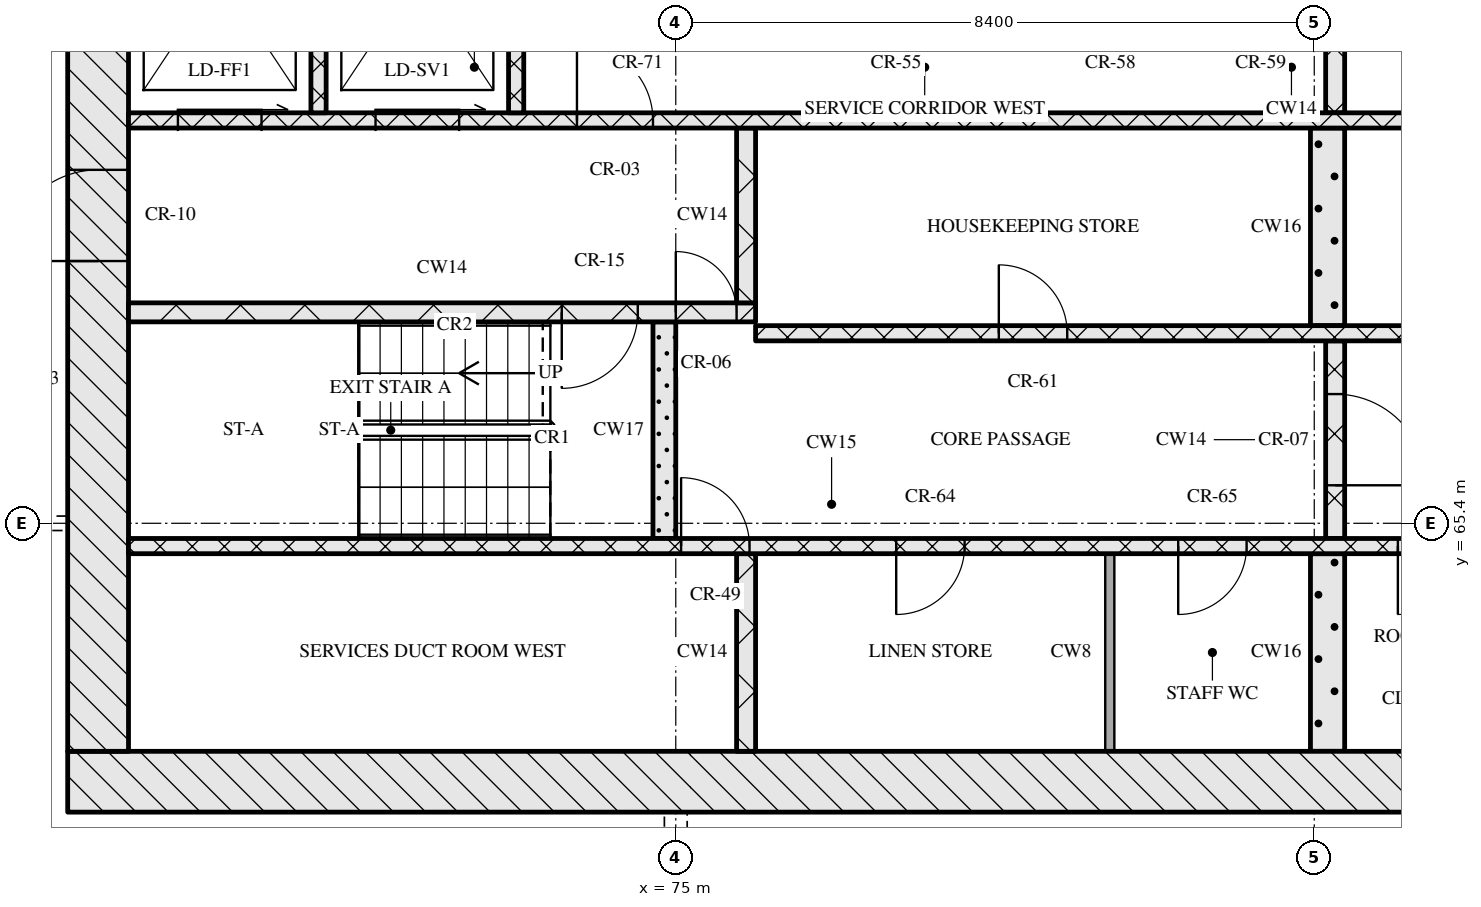
"""IFC4 building model, lengths in metres.
Left out: names, types, materials, properties, quantities, classifications, styles, units other than length and angle.
Written with IfcOpenShell. Run it as: python <this file> out.ifc"""

import sys

from ifc_helpers import new_model, si_unit, direction, frame, frame_2d, origin, place, context, subcontext, project, spatial, rectangle, extrude, element, fill, save


model = new_model("IFC4")
c1 = context("Model", 3, precision=1e-05, world=origin(), true_north=direction((0.0, 1.0)))
c2 = subcontext(c1, "Body", "Model", "MODEL_VIEW")
j1 = project(units=[si_unit("LENGTHUNIT", "METRE"), si_unit("PLANEANGLEUNIT", "RADIAN")], contexts=[c1])
p1 = place(None, origin())
s1 = spatial("IfcSite", under=j1, at=p1, CompositionType="ELEMENT")
p2 = place(p1, origin())
s2 = spatial("IfcBuilding", under=s1, at=p2, CompositionType="ELEMENT")
p3 = place(p2, frame((0.0, 0.0, 165.45)))
s3 = spatial("IfcBuildingStorey", under=s2, at=p3, CompositionType="ELEMENT", Elevation=165.45)
p4 = place(p3, frame((67.0, 62.0, 0.0), z_axis=(0.0, 0.0, 1.0), x_axis=(1.0, 0.0, 0.0)))
e1 = element("IfcWall", 1, at=p4, inside=s3, PredefinedType="SOLIDWALL", context=c2, shape_type="SweptSolid", body=[
    extrude(rectangle(XDim=41.2, YDim=0.8, at=frame_2d((20.6, 0.0))), origin(), (0.0, 0.0, 1.0), 3.32),
])
p5 = place(p4, frame((20.95, 0.0, 0.0)))
e2 = element("IfcOpeningElement", 2, at=p5, cuts=e1, PredefinedType="OPENING", context=c2, shape_type="SweptSolid", body=[
    extrude(rectangle(XDim=1.8, YDim=2.1, at=frame_2d((0.9, 1.05))), frame((0.0, 0.41, 0.0), z_axis=(0.0, -1.0, 0.0), x_axis=(1.0, 0.0, 0.0)), (0.0, 0.0, 1.0), 0.82),
])
p6 = place(p3, frame((67.4, 62.4, 0.0), z_axis=(0.0, 0.0, 1.0), x_axis=(0.0, 1.0, 0.0)))
e3 = element("IfcWall", 3, at=p6, inside=s3, PredefinedType="SOLIDWALL", context=c2, shape_type="SweptSolid", body=[
    extrude(rectangle(XDim=12.0, YDim=0.8, at=frame_2d((6.0, 0.0))), origin(), (0.0, 0.0, 1.0), 3.32),
])
p7 = place(p6, frame((6.45, 0.0, 0.0)))
e4 = element("IfcOpeningElement", 4, at=p7, cuts=e3, PredefinedType="OPENING", context=c2, shape_type="SweptSolid", body=[
    extrude(rectangle(XDim=1.2, YDim=2.1, at=frame_2d((0.6, 1.05))), frame((0.0, 0.41, 0.0), z_axis=(0.0, -1.0, 0.0), x_axis=(1.0, 0.0, 0.0)), (0.0, 0.0, 1.0), 0.82),
])
p8 = place(p3, frame((75.925, 62.4, 0.0), z_axis=(0.0, 0.0, 1.0), x_axis=(0.0, 1.0, 0.0)))
e5 = element("IfcWall", 5, at=p8, inside=s3, PredefinedType="SOLIDWALL", context=c2, shape_type="SweptSolid", body=[
    extrude(rectangle(XDim=2.6, YDim=0.25, at=frame_2d((1.3, 0.0))), origin(), (0.0, 0.0, 1.0), 3.32),
])
p9 = place(p3, frame((80.71, 62.4, 0.0), z_axis=(0.0, 0.0, 1.0), x_axis=(0.0, 1.0, 0.0)))
e6 = element("IfcWall", 6, at=p9, inside=s3, PredefinedType="PARTITIONING", context=c2, shape_type="SweptSolid", body=[
    extrude(rectangle(XDim=2.6, YDim=0.12, at=frame_2d((1.3, 0.0))), origin(), (0.0, 0.0, 1.0), 3.32),
])
p10 = place(p3, frame((83.575, 62.4, 0.0), z_axis=(0.0, 0.0, 1.0), x_axis=(0.0, 1.0, 0.0)))
e7 = element("IfcWall", 7, at=p10, inside=s3, PredefinedType="SOLIDWALL", context=c2, shape_type="SweptSolid", body=[
    extrude(rectangle(XDim=2.6, YDim=0.45, at=frame_2d((1.3, 0.0))), origin(), (0.0, 0.0, 1.0), 3.32),
])
p11 = place(p3, frame((67.8, 65.1, 0.0), z_axis=(0.0, 0.0, 1.0), x_axis=(1.0, 0.0, 0.0)))
e8 = element("IfcWall", 8, at=p11, inside=s3, PredefinedType="SOLIDWALL", context=c2, shape_type="SweptSolid", body=[
    extrude(rectangle(XDim=18.5, YDim=0.2, at=frame_2d((9.25, 0.0))), origin(), (0.0, 0.0, 1.0), 3.32),
])
p12 = place(p11, frame((7.27, 0.0, 0.0)))
e9 = element("IfcOpeningElement", 9, at=p12, cuts=e8, PredefinedType="OPENING", context=c2, shape_type="SweptSolid", body=[
    extrude(rectangle(XDim=0.9, YDim=2.1, at=frame_2d((0.45, 1.05))), frame((0.0, 0.11, 0.0), z_axis=(0.0, -1.0, 0.0), x_axis=(1.0, 0.0, 0.0)), (0.0, 0.0, 1.0), 0.22),
])
p13 = place(p11, frame((10.1, 0.0, 0.0)))
e10 = element("IfcOpeningElement", 10, at=p13, cuts=e8, PredefinedType="OPENING", context=c2, shape_type="SweptSolid", body=[
    extrude(rectangle(XDim=0.9, YDim=2.1, at=frame_2d((0.45, 1.05))), frame((0.0, 0.11, 0.0), z_axis=(0.0, -1.0, 0.0), x_axis=(1.0, 0.0, 0.0)), (0.0, 0.0, 1.0), 0.22),
])
p14 = place(p11, frame((13.81, 0.0, 0.0)))
e11 = element("IfcOpeningElement", 11, at=p14, cuts=e8, PredefinedType="OPENING", context=c2, shape_type="SweptSolid", body=[
    extrude(rectangle(XDim=0.9, YDim=2.1, at=frame_2d((0.45, 1.05))), frame((0.0, 0.11, 0.0), z_axis=(0.0, -1.0, 0.0), x_axis=(1.0, 0.0, 0.0)), (0.0, 0.0, 1.0), 0.22),
])
p15 = place(p11, frame((16.7, 0.0, 0.0)))
e12 = element("IfcOpeningElement", 12, at=p15, cuts=e8, PredefinedType="OPENING", context=c2, shape_type="SweptSolid", body=[
    extrude(rectangle(XDim=0.9, YDim=2.1, at=frame_2d((0.45, 1.05))), frame((0.0, 0.11, 0.0), z_axis=(0.0, -1.0, 0.0), x_axis=(1.0, 0.0, 0.0)), (0.0, 0.0, 1.0), 0.22),
])
p16 = place(p3, frame((74.85, 65.2, 0.0), z_axis=(0.0, 0.0, 1.0), x_axis=(0.0, 1.0, 0.0)))
e13 = element("IfcWall", 13, at=p16, inside=s3, PredefinedType="SOLIDWALL", context=c2, shape_type="SweptSolid", body=[
    extrude(rectangle(XDim=2.85, YDim=0.3, at=frame_2d((1.425, 0.0))), origin(), (0.0, 0.0, 1.0), 3.32),
])
p17 = place(p3, frame((83.675, 65.2, 0.0), z_axis=(0.0, 0.0, 1.0), x_axis=(0.0, 1.0, 0.0)))
e14 = element("IfcWall", 14, at=p17, inside=s3, PredefinedType="SOLIDWALL", context=c2, shape_type="SweptSolid", body=[
    extrude(rectangle(XDim=2.6, YDim=0.25, at=frame_2d((1.3, 0.0))), origin(), (0.0, 0.0, 1.0), 3.32),
])
p18 = place(p17, frame((0.7, 0.0, 0.0)))
e15 = element("IfcOpeningElement", 15, at=p18, cuts=e14, PredefinedType="OPENING", context=c2, shape_type="SweptSolid", body=[
    extrude(rectangle(XDim=1.2, YDim=2.1, at=frame_2d((0.6, 1.05))), frame((0.0, 0.135, 0.0), z_axis=(0.0, -1.0, 0.0), x_axis=(1.0, 0.0, 0.0)), (0.0, 0.0, 1.0), 0.27),
])
p19 = place(p3, frame((76.05, 67.9, 0.0), z_axis=(0.0, 0.0, 1.0), x_axis=(1.0, 0.0, 0.0)))
e16 = element("IfcWall", 16, at=p19, inside=s3, PredefinedType="SOLIDWALL", context=c2, shape_type="SweptSolid", body=[
    extrude(rectangle(XDim=23.1, YDim=0.2, at=frame_2d((11.55, 0.0))), origin(), (0.0, 0.0, 1.0), 3.32),
])
p20 = place(p19, frame((3.2, 0.0, 0.0)))
e17 = element("IfcOpeningElement", 17, at=p20, cuts=e16, PredefinedType="OPENING", context=c2, shape_type="SweptSolid", body=[
    extrude(rectangle(XDim=0.9, YDim=2.1, at=frame_2d((0.45, 1.05))), frame((0.0, 0.11, 0.0), z_axis=(0.0, -1.0, 0.0), x_axis=(1.0, 0.0, 0.0)), (0.0, 0.0, 1.0), 0.22),
])
p21 = place(p19, frame((9.7, 0.0, 0.0)))
e18 = element("IfcOpeningElement", 18, at=p21, cuts=e16, PredefinedType="OPENING", context=c2, shape_type="SweptSolid", body=[
    extrude(rectangle(XDim=0.9, YDim=2.1, at=frame_2d((0.45, 1.05))), frame((0.0, 0.11, 0.0), z_axis=(0.0, -1.0, 0.0), x_axis=(1.0, 0.0, 0.0)), (0.0, 0.0, 1.0), 0.22),
])
p22 = place(p19, frame((13.55, 0.0, 0.0)))
e19 = element("IfcOpeningElement", 19, at=p22, cuts=e16, PredefinedType="OPENING", context=c2, shape_type="SweptSolid", body=[
    extrude(rectangle(XDim=1.0, YDim=2.1, at=frame_2d((0.5, 1.05))), frame((0.0, 0.11, 0.0), z_axis=(0.0, -1.0, 0.0), x_axis=(1.0, 0.0, 0.0)), (0.0, 0.0, 1.0), 0.22),
])
p23 = place(p19, frame((16.2, 0.0, 0.0)))
e20 = element("IfcOpeningElement", 20, at=p23, cuts=e16, PredefinedType="OPENING", context=c2, shape_type="SweptSolid", body=[
    extrude(rectangle(XDim=1.1, YDim=2.1, at=frame_2d((0.55, 1.05))), frame((0.0, 0.11, 0.0), z_axis=(0.0, -1.0, 0.0), x_axis=(1.0, 0.0, 0.0)), (0.0, 0.0, 1.0), 0.22),
])
p24 = place(p19, frame((18.7, 0.0, 0.0)))
e21 = element("IfcOpeningElement", 21, at=p24, cuts=e16, PredefinedType="OPENING", context=c2, shape_type="SweptSolid", body=[
    extrude(rectangle(XDim=1.1, YDim=2.1, at=frame_2d((0.55, 1.05))), frame((0.0, 0.11, 0.0), z_axis=(0.0, -1.0, 0.0), x_axis=(1.0, 0.0, 0.0)), (0.0, 0.0, 1.0), 0.22),
])
p25 = place(p19, frame((21.2, 0.0, 0.0)))
e22 = element("IfcOpeningElement", 22, at=p25, cuts=e16, PredefinedType="OPENING", context=c2, shape_type="SweptSolid", body=[
    extrude(rectangle(XDim=1.1, YDim=2.1, at=frame_2d((0.55, 1.05))), frame((0.0, 0.11, 0.0), z_axis=(0.0, -1.0, 0.0), x_axis=(1.0, 0.0, 0.0)), (0.0, 0.0, 1.0), 0.22),
])
p26 = place(p3, frame((83.575, 68.0, 0.0), z_axis=(0.0, 0.0, 1.0), x_axis=(0.0, 1.0, 0.0)))
e23 = element("IfcWall", 23, at=p26, inside=s3, PredefinedType="SOLIDWALL", context=c2, shape_type="SweptSolid", body=[
    extrude(rectangle(XDim=2.6, YDim=0.45, at=frame_2d((1.3, 0.0))), origin(), (0.0, 0.0, 1.0), 3.32),
])
p27 = place(p3, frame((67.8, 68.175, 0.0), z_axis=(0.0, 0.0, 1.0), x_axis=(1.0, 0.0, 0.0)))
e24 = element("IfcWall", 24, at=p27, inside=s3, PredefinedType="SOLIDWALL", context=c2, shape_type="SweptSolid", body=[
    extrude(rectangle(XDim=8.25, YDim=0.25, at=frame_2d((4.125, 0.0))), origin(), (0.0, 0.0, 1.0), 3.32),
])
p28 = place(p27, frame((5.7, 0.0, 0.0)))
e25 = element("IfcOpeningElement", 25, at=p28, cuts=e24, PredefinedType="OPENING", context=c2, shape_type="SweptSolid", body=[
    extrude(rectangle(XDim=1.0, YDim=2.1, at=frame_2d((0.5, 1.05))), frame((0.0, 0.135, 0.0), z_axis=(0.0, -1.0, 0.0), x_axis=(1.0, 0.0, 0.0)), (0.0, 0.0, 1.0), 0.27),
])
p29 = place(p27, frame((7.2, 0.0, 0.0)))
e26 = element("IfcOpeningElement", 26, at=p29, cuts=e24, PredefinedType="OPENING", context=c2, shape_type="SweptSolid", body=[
    extrude(rectangle(XDim=0.8, YDim=2.1, at=frame_2d((0.4, 1.05))), frame((0.0, 0.135, 0.0), z_axis=(0.0, -1.0, 0.0), x_axis=(1.0, 0.0, 0.0)), (0.0, 0.0, 1.0), 0.27),
])
p30 = place(p3, frame((75.925, 68.3, 0.0), z_axis=(0.0, 0.0, 1.0), x_axis=(0.0, 1.0, 0.0)))
e27 = element("IfcWall", 27, at=p30, inside=s3, PredefinedType="SOLIDWALL", context=c2, shape_type="SweptSolid", body=[
    extrude(rectangle(XDim=2.3, YDim=0.25, at=frame_2d((1.15, 0.0))), origin(), (0.0, 0.0, 1.0), 3.32),
])
p31 = place(p3, frame((67.8, 70.7, 0.0), z_axis=(0.0, 0.0, 1.0), x_axis=(1.0, 0.0, 0.0)))
e28 = element("IfcWall", 28, at=p31, inside=s3, PredefinedType="SOLIDWALL", context=c2, shape_type="SweptSolid", body=[
    extrude(rectangle(XDim=39.6, YDim=0.2, at=frame_2d((19.8, 0.0))), origin(), (0.0, 0.0, 1.0), 3.32),
])
p32 = place(p31, frame((0.65, 0.0, 0.0)))
e29 = element("IfcOpeningElement", 29, at=p32, cuts=e28, PredefinedType="OPENING", context=c2, shape_type="SweptSolid", body=[
    extrude(rectangle(XDim=1.1, YDim=2.1, at=frame_2d((0.55, 1.05))), frame((0.0, 0.11, 0.0), z_axis=(0.0, -1.0, 0.0), x_axis=(1.0, 0.0, 0.0)), (0.0, 0.0, 1.0), 0.22),
])
p33 = place(p31, frame((3.25, 0.0, 0.0)))
e30 = element("IfcOpeningElement", 30, at=p33, cuts=e28, PredefinedType="OPENING", context=c2, shape_type="SweptSolid", body=[
    extrude(rectangle(XDim=1.1, YDim=2.1, at=frame_2d((0.55, 1.05))), frame((0.0, 0.11, 0.0), z_axis=(0.0, -1.0, 0.0), x_axis=(1.0, 0.0, 0.0)), (0.0, 0.0, 1.0), 0.22),
])
p34 = place(p31, frame((5.9, 0.0, 0.0)))
e31 = element("IfcOpeningElement", 31, at=p34, cuts=e28, PredefinedType="OPENING", context=c2, shape_type="SweptSolid", body=[
    extrude(rectangle(XDim=1.0, YDim=2.1, at=frame_2d((0.5, 1.05))), frame((0.0, 0.11, 0.0), z_axis=(0.0, -1.0, 0.0), x_axis=(1.0, 0.0, 0.0)), (0.0, 0.0, 1.0), 0.22),
])
p35 = place(p31, frame((21.7, 0.0, 0.0)))
e32 = element("IfcOpeningElement", 32, at=p35, cuts=e28, PredefinedType="OPENING", context=c2, shape_type="SweptSolid", body=[
    extrude(rectangle(XDim=1.0, YDim=2.1, at=frame_2d((0.5, 1.05))), frame((0.0, 0.11, 0.0), z_axis=(0.0, -1.0, 0.0), x_axis=(1.0, 0.0, 0.0)), (0.0, 0.0, 1.0), 0.22),
])
p36 = place(p31, frame((32.7, 0.0, 0.0)))
e33 = element("IfcOpeningElement", 33, at=p36, cuts=e28, PredefinedType="OPENING", context=c2, shape_type="SweptSolid", body=[
    extrude(rectangle(XDim=1.0, YDim=2.1, at=frame_2d((0.5, 1.05))), frame((0.0, 0.11, 0.0), z_axis=(0.0, -1.0, 0.0), x_axis=(1.0, 0.0, 0.0)), (0.0, 0.0, 1.0), 0.22),
])
p37 = place(p31, frame((35.25, 0.0, 0.0)))
e34 = element("IfcOpeningElement", 34, at=p37, cuts=e28, PredefinedType="OPENING", context=c2, shape_type="SweptSolid", body=[
    extrude(rectangle(XDim=1.1, YDim=2.1, at=frame_2d((0.55, 1.05))), frame((0.0, 0.11, 0.0), z_axis=(0.0, -1.0, 0.0), x_axis=(1.0, 0.0, 0.0)), (0.0, 0.0, 1.0), 0.22),
])
p38 = place(p31, frame((37.85, 0.0, 0.0)))
e35 = element("IfcOpeningElement", 35, at=p38, cuts=e28, PredefinedType="OPENING", context=c2, shape_type="SweptSolid", body=[
    extrude(rectangle(XDim=1.1, YDim=2.1, at=frame_2d((0.55, 1.05))), frame((0.0, 0.11, 0.0), z_axis=(0.0, -1.0, 0.0), x_axis=(1.0, 0.0, 0.0)), (0.0, 0.0, 1.0), 0.22),
])
p39 = place(p3, frame((70.3, 70.8, 0.0), z_axis=(0.0, 0.0, 1.0), x_axis=(0.0, 1.0, 0.0)))
e36 = element("IfcWall", 36, at=p39, inside=s3, PredefinedType="SOLIDWALL", context=c2, shape_type="SweptSolid", body=[
    extrude(rectangle(XDim=3.6, YDim=0.2, at=frame_2d((1.8, 0.0))), origin(), (0.0, 0.0, 1.0), 3.32),
])
p40 = place(p3, frame((72.9, 70.8, 0.0), z_axis=(0.0, 0.0, 1.0), x_axis=(0.0, 1.0, 0.0)))
e37 = element("IfcWall", 37, at=p40, inside=s3, PredefinedType="SOLIDWALL", context=c2, shape_type="SweptSolid", body=[
    extrude(rectangle(XDim=1.2, YDim=0.2, at=frame_2d((0.6, 0.0))), origin(), (0.0, 0.0, 1.0), 3.32),
])
p41 = place(p3, frame((83.675, 70.8, 0.0), z_axis=(0.0, 0.0, 1.0), x_axis=(0.0, 1.0, 0.0)))
e38 = element("IfcWall", 38, at=p41, inside=s3, PredefinedType="SOLIDWALL", context=c2, shape_type="SweptSolid", body=[
    extrude(rectangle(XDim=1.2, YDim=0.25, at=frame_2d((0.6, 0.0))), origin(), (0.0, 0.0, 1.0), 3.32),
])
p42 = place(p12, origin())
e39 = element("IfcDoor", 39, at=p42, inside=s3, OperationType="SINGLE_SWING_LEFT", PredefinedType="DOOR", context=c2, shape_type="SweptSolid", body=[
    extrude(rectangle(XDim=0.9, YDim=2.1, at=frame_2d((0.45, 1.05))), frame((0.0, 0.025, 0.0), z_axis=(0.0, -1.0, 0.0), x_axis=(1.0, 0.0, 0.0)), (0.0, 0.0, 1.0), 0.05),
])
fill(e9, e39)
p43 = place(p13, origin())
e40 = element("IfcDoor", 40, at=p43, inside=s3, OperationType="SINGLE_SWING_RIGHT", PredefinedType="DOOR", context=c2, shape_type="SweptSolid", body=[
    extrude(rectangle(XDim=0.9, YDim=2.1, at=frame_2d((0.45, 1.05))), frame((0.0, 0.025, 0.0), z_axis=(0.0, -1.0, 0.0), x_axis=(1.0, 0.0, 0.0)), (0.0, 0.0, 1.0), 0.05),
])
fill(e10, e40)
p44 = place(p14, origin())
e41 = element("IfcDoor", 41, at=p44, inside=s3, OperationType="SINGLE_SWING_RIGHT", PredefinedType="DOOR", context=c2, shape_type="SweptSolid", body=[
    extrude(rectangle(XDim=0.9, YDim=2.1, at=frame_2d((0.45, 1.05))), frame((0.0, 0.025, 0.0), z_axis=(0.0, -1.0, 0.0), x_axis=(1.0, 0.0, 0.0)), (0.0, 0.0, 1.0), 0.05),
])
fill(e11, e41)
p45 = place(p15, origin())
e42 = element("IfcDoor", 42, at=p45, inside=s3, OperationType="SINGLE_SWING_RIGHT", PredefinedType="DOOR", context=c2, shape_type="SweptSolid", body=[
    extrude(rectangle(XDim=0.9, YDim=2.1, at=frame_2d((0.45, 1.05))), frame((0.0, 0.025, 0.0), z_axis=(0.0, -1.0, 0.0), x_axis=(1.0, 0.0, 0.0)), (0.0, 0.0, 1.0), 0.05),
])
fill(e12, e42)
p46 = place(p18, origin())
e43 = element("IfcDoor", 43, at=p46, inside=s3, OperationType="SINGLE_SWING_RIGHT", PredefinedType="DOOR", context=c2, shape_type="SweptSolid", body=[
    extrude(rectangle(XDim=1.2, YDim=2.1, at=frame_2d((0.6, 1.05))), frame((0.0, 0.025, 0.0), z_axis=(0.0, -1.0, 0.0), x_axis=(1.0, 0.0, 0.0)), (0.0, 0.0, 1.0), 0.05),
])
fill(e15, e43)
p47 = place(p20, origin())
e44 = element("IfcDoor", 44, at=p47, inside=s3, OperationType="SINGLE_SWING_LEFT", PredefinedType="DOOR", context=c2, shape_type="SweptSolid", body=[
    extrude(rectangle(XDim=0.9, YDim=2.1, at=frame_2d((0.45, 1.05))), frame((0.0, 0.025, 0.0), z_axis=(0.0, -1.0, 0.0), x_axis=(1.0, 0.0, 0.0)), (0.0, 0.0, 1.0), 0.05),
])
fill(e17, e44)
p48 = place(p28, origin())
e45 = element("IfcDoor", 45, at=p48, inside=s3, OperationType="SINGLE_SWING_RIGHT", PredefinedType="DOOR", context=c2, shape_type="SweptSolid", body=[
    extrude(rectangle(XDim=1.0, YDim=2.1, at=frame_2d((0.5, 1.05))), frame((0.0, 0.025, 0.0), z_axis=(0.0, -1.0, 0.0), x_axis=(1.0, 0.0, 0.0)), (0.0, 0.0, 1.0), 0.05),
])
fill(e25, e45)
p49 = place(p29, origin())
e46 = element("IfcDoor", 46, at=p49, inside=s3, OperationType="SINGLE_SWING_LEFT", PredefinedType="DOOR", context=c2, shape_type="SweptSolid", body=[
    extrude(rectangle(XDim=0.8, YDim=2.1, at=frame_2d((0.4, 1.05))), frame((0.0, 0.025, 0.0), z_axis=(0.0, -1.0, 0.0), x_axis=(1.0, 0.0, 0.0)), (0.0, 0.0, 1.0), 0.05),
])
fill(e26, e46)
p50 = place(p7, origin())
e47 = element("IfcDoor", 47, at=p50, inside=s3, OperationType="SINGLE_SWING_LEFT", PredefinedType="DOOR", context=c2, shape_type="SweptSolid", body=[
    extrude(rectangle(XDim=1.2, YDim=2.1, at=frame_2d((0.6, 1.05))), frame((0.0, 0.025, 0.0), z_axis=(0.0, -1.0, 0.0), x_axis=(1.0, 0.0, 0.0)), (0.0, 0.0, 1.0), 0.05),
])
fill(e4, e47)
p51 = place(p32, origin())
e48 = element("IfcDoor", 48, at=p51, inside=s3, OperationType="SLIDING_TO_RIGHT", PredefinedType="DOOR", context=c2, shape_type="SweptSolid", body=[
    extrude(rectangle(XDim=1.1, YDim=2.1, at=frame_2d((0.55, 1.05))), frame((0.0, 0.025, 0.0), z_axis=(0.0, -1.0, 0.0), x_axis=(1.0, 0.0, 0.0)), (0.0, 0.0, 1.0), 0.05),
])
fill(e29, e48)
p52 = place(p33, origin())
e49 = element("IfcDoor", 49, at=p52, inside=s3, OperationType="SLIDING_TO_RIGHT", PredefinedType="DOOR", context=c2, shape_type="SweptSolid", body=[
    extrude(rectangle(XDim=1.1, YDim=2.1, at=frame_2d((0.55, 1.05))), frame((0.0, 0.025, 0.0), z_axis=(0.0, -1.0, 0.0), x_axis=(1.0, 0.0, 0.0)), (0.0, 0.0, 1.0), 0.05),
])
fill(e30, e49)
p53 = place(p34, origin())
e50 = element("IfcDoor", 50, at=p53, inside=s3, OperationType="SINGLE_SWING_LEFT", PredefinedType="DOOR", context=c2, shape_type="SweptSolid", body=[
    extrude(rectangle(XDim=1.0, YDim=2.1, at=frame_2d((0.5, 1.05))), frame((0.0, 0.025, 0.0), z_axis=(0.0, -1.0, 0.0), x_axis=(1.0, 0.0, 0.0)), (0.0, 0.0, 1.0), 0.05),
])
fill(e31, e50)
save(model, sys.argv[1])
